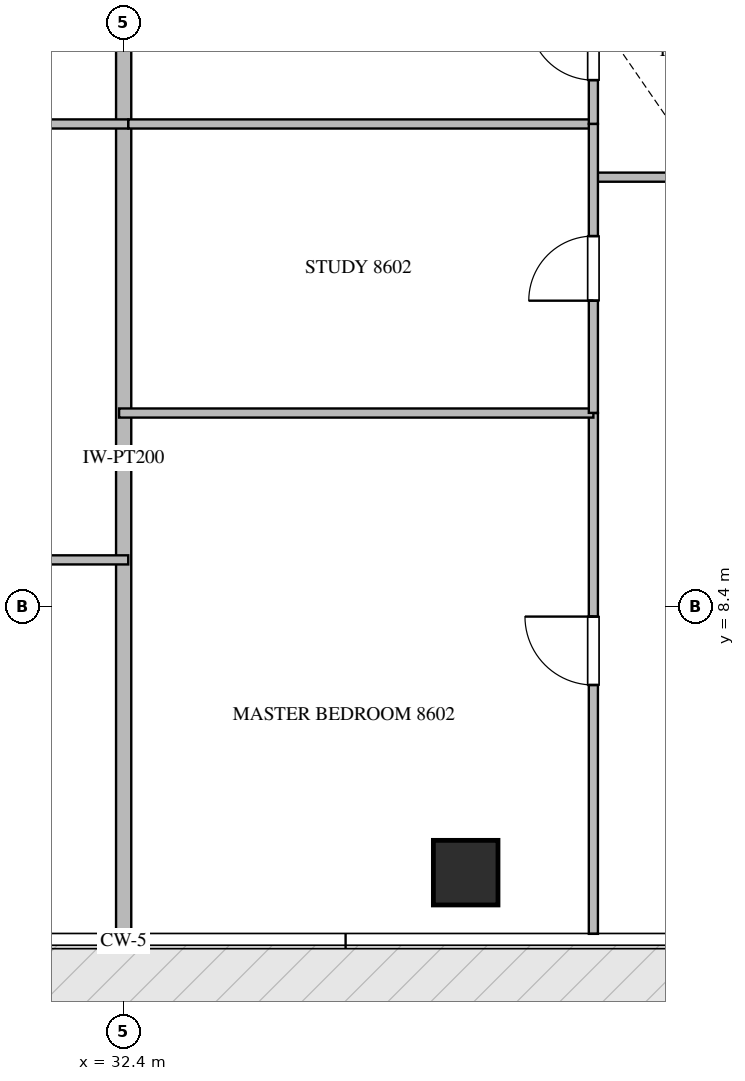
"""IFC4 building model, lengths in metres.
Left out: names, types, materials, properties, quantities, classifications, styles, units other than length and angle.
Written with IfcOpenShell. Run it as: python <this file> out.ifc"""

import sys

from ifc_helpers import new_model, si_unit, direction, frame, frame_2d, origin, origin_2d, place, context, subcontext, project, spatial, rectangle, extrude, source, transform, mapped, element, fill, save


model = new_model("IFC4")
c1 = context("Model", 3, precision=1e-05, world=origin(), true_north=direction((0.0, 1.0)))
c2 = subcontext(c1, "Body", "Model", "MODEL_VIEW")
j1 = project(units=[si_unit("LENGTHUNIT", "METRE"), si_unit("PLANEANGLEUNIT", "RADIAN")], contexts=[c1])
p1 = place(None, origin())
s1 = spatial("IfcSite", under=j1, at=p1, CompositionType="ELEMENT")
p2 = place(p1, origin())
s2 = spatial("IfcBuilding", under=s1, at=p2, CompositionType="ELEMENT")
p3 = place(p2, frame((0.0, 0.0, 347.95)))
s3 = spatial("IfcBuildingStorey", under=s2, at=p3, CompositionType="ELEMENT", Elevation=347.95)
m1 = source(origin(), c2, "Body", "SweptSolid", [
    extrude(rectangle(XDim=0.85, YDim=0.85, at=origin_2d()), origin(), (0.0, 0.0, 1.0), 5.9),
])
p4 = place(p3, frame((36.9, 4.9, -0.26), z_axis=(0.0, 0.0, 1.0), x_axis=(1.0, 0.0, 0.0)))
e1 = element("IfcColumn", 1, at=p4, inside=s3, PredefinedType="COLUMN", context=c2, shape_type="MappedRepresentation", body=[
    mapped(m1, transform((0.0, 0.0, 0.0), scale=1.0)),
])
p5 = place(p3, frame((32.4, 4.082, 0.0), z_axis=(0.0, 0.0, 1.0), x_axis=(0.0, 1.0, 0.0)))
e2 = element("IfcWall", 2, at=p5, inside=s3, PredefinedType="PARTITIONING", context=c2, shape_type="SweptSolid", body=[
    extrude(rectangle(XDim=12.543, YDim=0.2, at=frame_2d((6.271, 0.0))), origin(), (0.0, 0.0, 1.0), 5.64),
])
for number, where, z_axis, x_axis in (
    (3, (26.22, 9.015, 0.0), (0.0, 0.0, 1.0), (1.0, 0.0, 0.0)),
    (4, (26.22, 14.75, 0.0), (0.0, 0.0, 1.0), (1.0, 0.0, 0.0)),
):
    element("IfcWall", number, at=place(p3, frame(where, z_axis=z_axis, x_axis=x_axis)), inside=s3, PredefinedType="PARTITIONING", context=c2, shape_type="SweptSolid", body=[
        extrude(rectangle(XDim=6.24, YDim=0.12, at=frame_2d((3.12, 0.0))), origin(), (0.0, 0.0, 1.0), 5.64),
    ])
p6 = place(p3, frame((38.58, 14.05, 0.0), z_axis=(0.0, 0.0, 1.0), x_axis=(1.0, 0.0, 0.0)))
e5 = element("IfcWall", 5, at=p6, inside=s3, PredefinedType="PARTITIONING", context=c2, shape_type="SweptSolid", body=[
    extrude(rectangle(XDim=2.85, YDim=0.12, at=frame_2d((1.425, 0.0))), origin(), (0.0, 0.0, 1.0), 5.64),
])
p7 = place(p6, frame((1.0, 0.0, 0.0)))
e6 = element("IfcOpeningElement", 6, at=p7, cuts=e5, PredefinedType="OPENING", context=c2, shape_type="SweptSolid", body=[
    extrude(rectangle(XDim=0.85, YDim=2.1, at=frame_2d((0.425, 1.05))), frame((0.0, 0.07, 0.0), z_axis=(0.0, -1.0, 0.0), x_axis=(1.0, 0.0, 0.0)), (0.0, 0.0, 1.0), 0.14),
])
p8 = place(p3, frame((38.58, 4.095, 0.0), z_axis=(0.0, 0.0, 1.0), x_axis=(0.0, 1.0, 0.0)))
e7 = element("IfcWall", 7, at=p8, inside=s3, PredefinedType="PARTITIONING", context=c2, shape_type="SweptSolid", body=[
    extrude(rectangle(XDim=6.852, YDim=0.12, at=frame_2d((3.426, 0.0))), origin(), (0.0, 0.0, 1.0), 5.64),
])
p9 = place(p8, frame((3.274, 0.0, 0.0)))
e8 = element("IfcOpeningElement", 8, at=p9, cuts=e7, PredefinedType="OPENING", context=c2, shape_type="SweptSolid", body=[
    extrude(rectangle(XDim=0.9, YDim=2.1, at=frame_2d((0.45, 1.05))), frame((0.0, 0.07, 0.0), z_axis=(0.0, -1.0, 0.0), x_axis=(1.0, 0.0, 0.0)), (0.0, 0.0, 1.0), 0.14),
])
p10 = place(p3, frame((32.34, 10.947, 0.0), z_axis=(0.0, 0.0, 1.0), x_axis=(1.0, 0.0, 0.0)))
e9 = element("IfcWall", 9, at=p10, inside=s3, PredefinedType="PARTITIONING", context=c2, shape_type="SweptSolid", body=[
    extrude(rectangle(XDim=6.24, YDim=0.12, at=frame_2d((3.12, 0.0))), origin(), (0.0, 0.0, 1.0), 5.64),
])
p11 = place(p3, frame((32.462, 14.75, 0.0), z_axis=(0.0, 0.0, 1.0), x_axis=(1.0, 0.0, 0.0)))
e10 = element("IfcWall", 10, at=p11, inside=s3, PredefinedType="PARTITIONING", context=c2, shape_type="SweptSolid", body=[
    extrude(rectangle(XDim=6.118, YDim=0.12, at=frame_2d((3.059, 0.0))), origin(), (0.0, 0.0, 1.0), 5.64),
])
p12 = place(p3, frame((38.58, 10.949, 0.0), z_axis=(0.0, 0.0, 1.0), x_axis=(0.0, 1.0, 0.0)))
e11 = element("IfcWall", 11, at=p12, inside=s3, PredefinedType="PARTITIONING", context=c2, shape_type="SweptSolid", body=[
    extrude(rectangle(XDim=3.801, YDim=0.12, at=frame_2d((1.9, 0.0))), origin(), (0.0, 0.0, 1.0), 5.64),
])
p13 = place(p12, frame((1.476, 0.0, 0.0)))
e12 = element("IfcOpeningElement", 12, at=p13, cuts=e11, PredefinedType="OPENING", context=c2, shape_type="SweptSolid", body=[
    extrude(rectangle(XDim=0.85, YDim=2.1, at=frame_2d((0.425, 1.05))), frame((0.0, 0.07, 0.0), z_axis=(0.0, -1.0, 0.0), x_axis=(1.0, 0.0, 0.0)), (0.0, 0.0, 1.0), 0.14),
])
p14 = place(p3, frame((38.58, 14.752, 0.0), z_axis=(0.0, 0.0, 1.0), x_axis=(0.0, 1.0, 0.0)))
e13 = element("IfcWall", 13, at=p14, inside=s3, PredefinedType="PARTITIONING", context=c2, shape_type="SweptSolid", body=[
    extrude(rectangle(XDim=1.873, YDim=0.12, at=frame_2d((0.937, 0.0))), origin(), (0.0, 0.0, 1.0), 5.64),
])
p15 = place(p14, frame((0.575, 0.0, 0.0)))
e14 = element("IfcOpeningElement", 14, at=p15, cuts=e13, PredefinedType="OPENING", context=c2, shape_type="SweptSolid", body=[
    extrude(rectangle(XDim=0.85, YDim=2.1, at=frame_2d((0.425, 1.05))), frame((0.0, 0.07, 0.0), z_axis=(0.0, -1.0, 0.0), x_axis=(1.0, 0.0, 0.0)), (0.0, 0.0, 1.0), 0.14),
])
m2 = source(origin(), c2, "Body", "SweptSolid", [
    extrude(rectangle(XDim=0.9, YDim=2.1, at=frame_2d((0.45, 1.05))), frame((0.0, 0.025, 0.0), z_axis=(0.0, -1.0, 0.0), x_axis=(1.0, 0.0, 0.0)), (0.0, 0.0, 1.0), 0.05),
])
p16 = place(p9, origin())
e15 = element("IfcDoor", 15, at=p16, inside=s3, OperationType="SINGLE_SWING_RIGHT", PredefinedType="DOOR", context=c2, shape_type="MappedRepresentation", body=[
    mapped(m2, transform((0.0, 0.0, 0.0), scale=1.0)),
])
fill(e8, e15)
m3 = source(origin(), c2, "Body", "SweptSolid", [
    extrude(rectangle(XDim=0.85, YDim=2.1, at=frame_2d((0.425, 1.05))), frame((0.0, 0.025, 0.0), z_axis=(0.0, -1.0, 0.0), x_axis=(1.0, 0.0, 0.0)), (0.0, 0.0, 1.0), 0.05),
])
p17 = place(p13, origin())
e16 = element("IfcDoor", 16, at=p17, inside=s3, OperationType="SINGLE_SWING_LEFT", PredefinedType="DOOR", context=c2, shape_type="MappedRepresentation", body=[
    mapped(m3, transform((0.0, 0.0, 0.0), scale=1.0)),
])
fill(e12, e16)
p18 = place(p15, origin())
e17 = element("IfcDoor", 17, at=p18, inside=s3, OperationType="SINGLE_SWING_RIGHT", PredefinedType="DOOR", context=c2, shape_type="MappedRepresentation", body=[
    mapped(m3, transform((0.0, 0.0, 0.0), scale=1.0)),
])
fill(e14, e17)
save(model, sys.argv[1])
